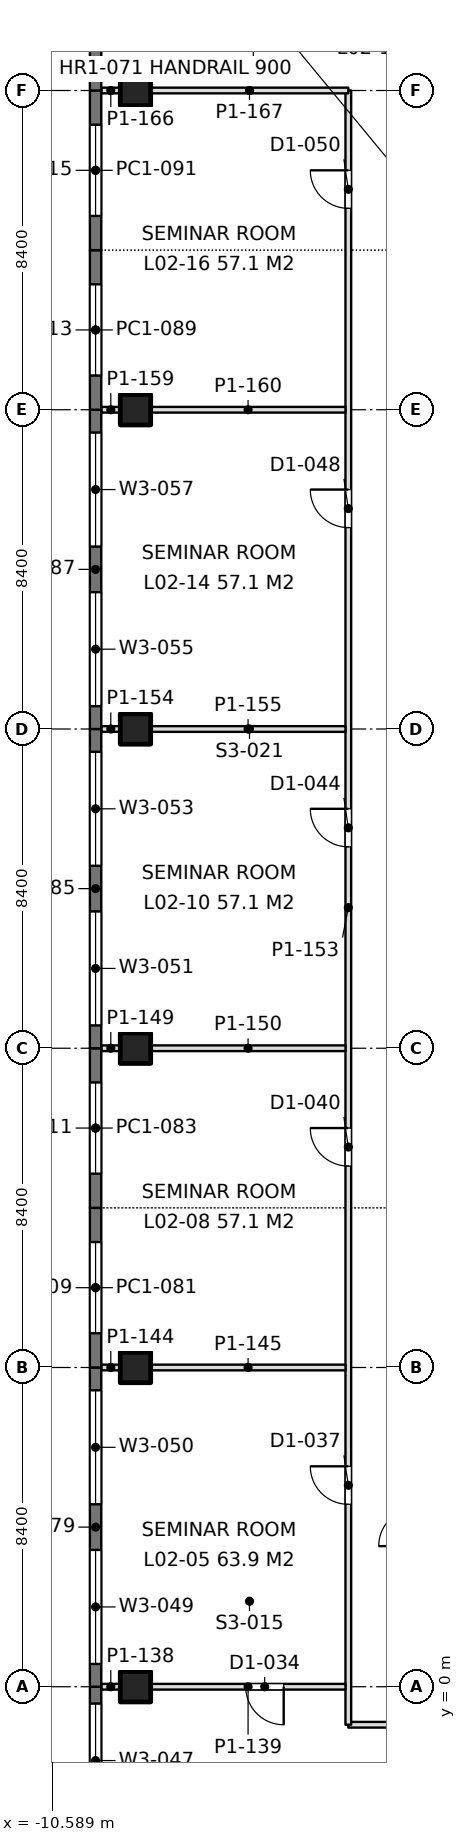
"""IFC4 building model, lengths in metres.
Left out: names, types, materials, properties, quantities, classifications, styles, units other than length and angle.
Written with IfcOpenShell. Run it as: python <this file> out.ifc"""

import sys

from ifc_helpers import new_model, si_unit, direction, frame, frame_2d, origin, origin_2d, place, context, subcontext, project, spatial, rectangle, extrude, element, fill, save


model = new_model("IFC4")
c1 = context("Model", 3, precision=1e-05, world=origin(), true_north=direction((0.0, 1.0)))
c2 = subcontext(c1, "Body", "Model", "MODEL_VIEW")
j1 = project(units=[si_unit("LENGTHUNIT", "METRE"), si_unit("PLANEANGLEUNIT", "RADIAN")], contexts=[c1])
p1 = place(None, origin())
s1 = spatial("IfcSite", under=j1, at=p1, CompositionType="ELEMENT")
p2 = place(p1, origin())
s2 = spatial("IfcBuilding", under=s1, at=p2, CompositionType="ELEMENT")
p3 = place(p2, frame((0.0, 0.0, 9.9)))
s3 = spatial("IfcBuildingStorey", under=s2, at=p3, CompositionType="ELEMENT", Elevation=9.9)
for number, where, z_axis, x_axis in (
    (1, (-8.4, 0.0, 0.0), (0.0, 0.0, 1.0), (1.0, 0.0, 0.0)),
    (2, (-8.4, 8.4, 0.0), (0.0, 0.0, 1.0), (1.0, 0.0, 0.0)),
    (3, (-8.4, 16.8, 0.0), (0.0, 0.0, 1.0), (1.0, 0.0, 0.0)),
    (4, (-8.4, 25.2, 0.0), (0.0, 0.0, 1.0), (1.0, 0.0, 0.0)),
    (5, (-8.4, 33.6, 0.0), (0.0, 0.0, 1.0), (1.0, 0.0, 0.0)),
    (6, (-8.4, 42.0, 0.0), (0.0, 0.0, 1.0), (1.0, 0.0, 0.0)),
):
    element("IfcColumn", number, at=place(p3, frame(where, z_axis=z_axis, x_axis=x_axis)), inside=s3, PredefinedType="COLUMN", context=c2, shape_type="SweptSolid", body=[
        extrude(rectangle(XDim=0.8, YDim=0.8, at=origin_2d()), origin(), (0.0, 0.0, 1.0), 4.5),
    ])
p4 = place(p3, frame((-9.45, -8.085, 0.0), z_axis=(0.0, 0.0, 1.0), x_axis=(0.0, 1.0, 0.0)))
e7 = element("IfcWall", 7, at=p4, inside=s3, PredefinedType="SOLIDWALL", context=c2, shape_type="SweptSolid", body=[
    extrude(rectangle(XDim=8.085, YDim=0.3, at=frame_2d((4.042, 0.0))), origin(), (0.0, 0.0, 1.0), 4.3),
])
p5 = place(p4, frame((0.443, 0.0, 0.9)))
e8 = element("IfcOpeningElement", 8, at=p5, cuts=e7, PredefinedType="OPENING", context=c2, shape_type="SweptSolid", body=[
    extrude(rectangle(XDim=3.0, YDim=2.4, at=frame_2d((1.5, 1.2))), frame((0.0, 0.16, 0.0), z_axis=(0.0, -1.0, 0.0), x_axis=(1.0, 0.0, 0.0)), (0.0, 0.0, 1.0), 0.32),
])
p6 = place(p4, frame((4.643, 0.0, 0.9)))
e9 = element("IfcOpeningElement", 9, at=p6, cuts=e7, PredefinedType="OPENING", context=c2, shape_type="SweptSolid", body=[
    extrude(rectangle(XDim=3.0, YDim=2.4, at=frame_2d((1.5, 1.2))), frame((0.0, 0.16, 0.0), z_axis=(0.0, -1.0, 0.0), x_axis=(1.0, 0.0, 0.0)), (0.0, 0.0, 1.0), 0.32),
])
p7 = place(p3, frame((-9.45, 0.0, 0.0), z_axis=(0.0, 0.0, 1.0), x_axis=(0.0, 1.0, 0.0)))
e10 = element("IfcWall", 10, at=p7, inside=s3, PredefinedType="SOLIDWALL", context=c2, shape_type="SweptSolid", body=[
    extrude(rectangle(XDim=8.4, YDim=0.3, at=frame_2d((4.2, 0.0))), origin(), (0.0, 0.0, 1.0), 4.3),
])
p8 = place(p7, frame((0.6, 0.0, 0.9)))
e11 = element("IfcOpeningElement", 11, at=p8, cuts=e10, PredefinedType="OPENING", context=c2, shape_type="SweptSolid", body=[
    extrude(rectangle(XDim=3.0, YDim=2.4, at=frame_2d((1.5, 1.2))), frame((0.0, 0.16, 0.0), z_axis=(0.0, -1.0, 0.0), x_axis=(1.0, 0.0, 0.0)), (0.0, 0.0, 1.0), 0.32),
])
p9 = place(p7, frame((4.8, 0.0, 0.9)))
e12 = element("IfcOpeningElement", 12, at=p9, cuts=e10, PredefinedType="OPENING", context=c2, shape_type="SweptSolid", body=[
    extrude(rectangle(XDim=3.0, YDim=2.4, at=frame_2d((1.5, 1.2))), frame((0.0, 0.16, 0.0), z_axis=(0.0, -1.0, 0.0), x_axis=(1.0, 0.0, 0.0)), (0.0, 0.0, 1.0), 0.32),
])
p10 = place(p3, frame((-9.45, 8.4, 0.0), z_axis=(0.0, 0.0, 1.0), x_axis=(0.0, 1.0, 0.0)))
e13 = element("IfcWall", 13, at=p10, inside=s3, PredefinedType="SOLIDWALL", context=c2, shape_type="SweptSolid", body=[
    extrude(rectangle(XDim=4.2, YDim=0.3, at=frame_2d((2.1, 0.0))), origin(), (0.0, 0.0, 1.0), 4.3),
])
p11 = place(p10, frame((0.9, 0.0, 0.9)))
e14 = element("IfcOpeningElement", 14, at=p11, cuts=e13, PredefinedType="OPENING", context=c2, shape_type="SweptSolid", body=[
    extrude(rectangle(XDim=2.4, YDim=1.9, at=frame_2d((1.2, 0.95))), frame((0.0, 0.16, 0.0), z_axis=(0.0, -1.0, 0.0), x_axis=(1.0, 0.0, 0.0)), (0.0, 0.0, 1.0), 0.32),
])
p12 = place(p3, frame((-9.45, 12.6, 0.0), z_axis=(0.0, 0.0, 1.0), x_axis=(0.0, 1.0, 0.0)))
e15 = element("IfcWall", 15, at=p12, inside=s3, PredefinedType="SOLIDWALL", context=c2, shape_type="SweptSolid", body=[
    extrude(rectangle(XDim=4.2, YDim=0.3, at=frame_2d((2.1, 0.0))), origin(), (0.0, 0.0, 1.0), 4.3),
])
p13 = place(p12, frame((0.9, 0.0, 0.9)))
e16 = element("IfcOpeningElement", 16, at=p13, cuts=e15, PredefinedType="OPENING", context=c2, shape_type="SweptSolid", body=[
    extrude(rectangle(XDim=2.4, YDim=1.9, at=frame_2d((1.2, 0.95))), frame((0.0, 0.16, 0.0), z_axis=(0.0, -1.0, 0.0), x_axis=(1.0, 0.0, 0.0)), (0.0, 0.0, 1.0), 0.32),
])
p14 = place(p3, frame((-9.45, 16.8, 0.0), z_axis=(0.0, 0.0, 1.0), x_axis=(0.0, 1.0, 0.0)))
e17 = element("IfcWall", 17, at=p14, inside=s3, PredefinedType="SOLIDWALL", context=c2, shape_type="SweptSolid", body=[
    extrude(rectangle(XDim=8.4, YDim=0.3, at=frame_2d((4.2, 0.0))), origin(), (0.0, 0.0, 1.0), 4.3),
])
p15 = place(p14, frame((0.6, 0.0, 0.9)))
e18 = element("IfcOpeningElement", 18, at=p15, cuts=e17, PredefinedType="OPENING", context=c2, shape_type="SweptSolid", body=[
    extrude(rectangle(XDim=3.0, YDim=2.4, at=frame_2d((1.5, 1.2))), frame((0.0, 0.16, 0.0), z_axis=(0.0, -1.0, 0.0), x_axis=(1.0, 0.0, 0.0)), (0.0, 0.0, 1.0), 0.32),
])
p16 = place(p14, frame((4.8, 0.0, 0.9)))
e19 = element("IfcOpeningElement", 19, at=p16, cuts=e17, PredefinedType="OPENING", context=c2, shape_type="SweptSolid", body=[
    extrude(rectangle(XDim=3.0, YDim=2.4, at=frame_2d((1.5, 1.2))), frame((0.0, 0.16, 0.0), z_axis=(0.0, -1.0, 0.0), x_axis=(1.0, 0.0, 0.0)), (0.0, 0.0, 1.0), 0.32),
])
p17 = place(p3, frame((-9.45, 25.2, 0.0), z_axis=(0.0, 0.0, 1.0), x_axis=(0.0, 1.0, 0.0)))
e20 = element("IfcWall", 20, at=p17, inside=s3, PredefinedType="SOLIDWALL", context=c2, shape_type="SweptSolid", body=[
    extrude(rectangle(XDim=8.4, YDim=0.3, at=frame_2d((4.2, 0.0))), origin(), (0.0, 0.0, 1.0), 4.3),
])
p18 = place(p17, frame((0.6, 0.0, 0.9)))
e21 = element("IfcOpeningElement", 21, at=p18, cuts=e20, PredefinedType="OPENING", context=c2, shape_type="SweptSolid", body=[
    extrude(rectangle(XDim=3.0, YDim=2.4, at=frame_2d((1.5, 1.2))), frame((0.0, 0.16, 0.0), z_axis=(0.0, -1.0, 0.0), x_axis=(1.0, 0.0, 0.0)), (0.0, 0.0, 1.0), 0.32),
])
p19 = place(p17, frame((4.8, 0.0, 0.9)))
e22 = element("IfcOpeningElement", 22, at=p19, cuts=e20, PredefinedType="OPENING", context=c2, shape_type="SweptSolid", body=[
    extrude(rectangle(XDim=3.0, YDim=2.4, at=frame_2d((1.5, 1.2))), frame((0.0, 0.16, 0.0), z_axis=(0.0, -1.0, 0.0), x_axis=(1.0, 0.0, 0.0)), (0.0, 0.0, 1.0), 0.32),
])
p20 = place(p3, frame((-9.45, 33.6, 0.0), z_axis=(0.0, 0.0, 1.0), x_axis=(0.0, 1.0, 0.0)))
e23 = element("IfcWall", 23, at=p20, inside=s3, PredefinedType="SOLIDWALL", context=c2, shape_type="SweptSolid", body=[
    extrude(rectangle(XDim=4.2, YDim=0.3, at=frame_2d((2.1, 0.0))), origin(), (0.0, 0.0, 1.0), 4.3),
])
p21 = place(p20, frame((0.9, 0.0, 0.9)))
e24 = element("IfcOpeningElement", 24, at=p21, cuts=e23, PredefinedType="OPENING", context=c2, shape_type="SweptSolid", body=[
    extrude(rectangle(XDim=2.4, YDim=1.9, at=frame_2d((1.2, 0.95))), frame((0.0, 0.16, 0.0), z_axis=(0.0, -1.0, 0.0), x_axis=(1.0, 0.0, 0.0)), (0.0, 0.0, 1.0), 0.32),
])
p22 = place(p3, frame((-9.45, 37.8, 0.0), z_axis=(0.0, 0.0, 1.0), x_axis=(0.0, 1.0, 0.0)))
e25 = element("IfcWall", 25, at=p22, inside=s3, PredefinedType="SOLIDWALL", context=c2, shape_type="SweptSolid", body=[
    extrude(rectangle(XDim=4.2, YDim=0.3, at=frame_2d((2.1, 0.0))), origin(), (0.0, 0.0, 1.0), 4.3),
])
p23 = place(p22, frame((0.9, 0.0, 0.9)))
e26 = element("IfcOpeningElement", 26, at=p23, cuts=e25, PredefinedType="OPENING", context=c2, shape_type="SweptSolid", body=[
    extrude(rectangle(XDim=2.4, YDim=1.9, at=frame_2d((1.2, 0.95))), frame((0.0, 0.16, 0.0), z_axis=(0.0, -1.0, 0.0), x_axis=(1.0, 0.0, 0.0)), (0.0, 0.0, 1.0), 0.32),
])
p24 = place(p3, frame((-9.45, 42.0, 0.0), z_axis=(0.0, 0.0, 1.0), x_axis=(0.0, 1.0, 0.0)))
e27 = element("IfcWall", 27, at=p24, inside=s3, PredefinedType="SOLIDWALL", context=c2, shape_type="SweptSolid", body=[
    extrude(rectangle(XDim=8.4, YDim=0.3, at=frame_2d((4.2, 0.0))), origin(), (0.0, 0.0, 1.0), 4.3),
])
p25 = place(p3, frame((-2.8, -1.0, 0.0), z_axis=(0.0, 0.0, 1.0), x_axis=(1.0, 0.0, 0.0)))
e28 = element("IfcWall", 28, at=p25, inside=s3, PredefinedType="PARTITIONING", context=c2, shape_type="SweptSolid", body=[
    extrude(rectangle(XDim=4.18, YDim=0.15, at=frame_2d((2.09, 0.0))), origin(), (0.0, 0.0, 1.0), 3.65),
])
p26 = place(p3, frame((-9.3, 0.0, 0.0), z_axis=(0.0, 0.0, 1.0), x_axis=(1.0, 0.0, 0.0)))
e29 = element("IfcWall", 29, at=p26, inside=s3, PredefinedType="PARTITIONING", context=c2, shape_type="SweptSolid", body=[
    extrude(rectangle(XDim=0.501, YDim=0.15, at=frame_2d((0.25, 0.0))), origin(), (0.0, 0.0, 1.0), 4.3),
])
p27 = place(p3, frame((-8.001, 0.0, 0.0), z_axis=(0.0, 0.0, 1.0), x_axis=(1.0, 0.0, 0.0)))
e30 = element("IfcWall", 30, at=p27, inside=s3, PredefinedType="PARTITIONING", context=c2, shape_type="SweptSolid", body=[
    extrude(rectangle(XDim=5.127, YDim=0.15, at=frame_2d((2.563, 0.0))), origin(), (0.0, 0.0, 1.0), 3.65),
])
p28 = place(p27, frame((2.501, 0.0, 0.0)))
e31 = element("IfcOpeningElement", 31, at=p28, cuts=e30, PredefinedType="OPENING", context=c2, shape_type="SweptSolid", body=[
    extrude(rectangle(XDim=1.0, YDim=2.2, at=frame_2d((0.5, 1.1))), frame((0.0, 0.085, 0.0), z_axis=(0.0, -1.0, 0.0), x_axis=(1.0, 0.0, 0.0)), (0.0, 0.0, 1.0), 0.17),
])
p29 = place(p3, frame((-2.8, -1.0, 0.0), z_axis=(0.0, 0.0, 1.0), x_axis=(0.0, 1.0, 0.0)))
e32 = element("IfcWall", 32, at=p29, inside=s3, PredefinedType="PARTITIONING", context=c2, shape_type="SweptSolid", body=[
    extrude(rectangle(XDim=43.0, YDim=0.15, at=frame_2d((21.5, 0.0))), origin(), (0.0, 0.0, 1.0), 3.65),
])
p30 = place(p29, frame((5.8, 0.0, 0.0)))
e33 = element("IfcOpeningElement", 33, at=p30, cuts=e32, PredefinedType="OPENING", context=c2, shape_type="SweptSolid", body=[
    extrude(rectangle(XDim=1.0, YDim=2.2, at=frame_2d((0.5, 1.1))), frame((0.0, 0.085, 0.0), z_axis=(0.0, -1.0, 0.0), x_axis=(1.0, 0.0, 0.0)), (0.0, 0.0, 1.0), 0.17),
])
p31 = place(p29, frame((14.7, 0.0, 0.0)))
e34 = element("IfcOpeningElement", 34, at=p31, cuts=e32, PredefinedType="OPENING", context=c2, shape_type="SweptSolid", body=[
    extrude(rectangle(XDim=1.0, YDim=2.2, at=frame_2d((0.5, 1.1))), frame((0.0, 0.085, 0.0), z_axis=(0.0, -1.0, 0.0), x_axis=(1.0, 0.0, 0.0)), (0.0, 0.0, 1.0), 0.17),
])
p32 = place(p29, frame((23.1, 0.0, 0.0)))
e35 = element("IfcOpeningElement", 35, at=p32, cuts=e32, PredefinedType="OPENING", context=c2, shape_type="SweptSolid", body=[
    extrude(rectangle(XDim=1.0, YDim=2.2, at=frame_2d((0.5, 1.1))), frame((0.0, 0.085, 0.0), z_axis=(0.0, -1.0, 0.0), x_axis=(1.0, 0.0, 0.0)), (0.0, 0.0, 1.0), 0.17),
])
p33 = place(p29, frame((31.5, 0.0, 0.0)))
e36 = element("IfcOpeningElement", 36, at=p33, cuts=e32, PredefinedType="OPENING", context=c2, shape_type="SweptSolid", body=[
    extrude(rectangle(XDim=1.0, YDim=2.2, at=frame_2d((0.5, 1.1))), frame((0.0, 0.085, 0.0), z_axis=(0.0, -1.0, 0.0), x_axis=(1.0, 0.0, 0.0)), (0.0, 0.0, 1.0), 0.17),
])
p34 = place(p29, frame((39.9, 0.0, 0.0)))
e37 = element("IfcOpeningElement", 37, at=p34, cuts=e32, PredefinedType="OPENING", context=c2, shape_type="SweptSolid", body=[
    extrude(rectangle(XDim=1.0, YDim=2.2, at=frame_2d((0.5, 1.1))), frame((0.0, 0.085, 0.0), z_axis=(0.0, -1.0, 0.0), x_axis=(1.0, 0.0, 0.0)), (0.0, 0.0, 1.0), 0.17),
])
p35 = place(p3, frame((-9.3, 8.4, 0.0), z_axis=(0.0, 0.0, 1.0), x_axis=(1.0, 0.0, 0.0)))
e38 = element("IfcWall", 38, at=p35, inside=s3, PredefinedType="PARTITIONING", context=c2, shape_type="SweptSolid", body=[
    extrude(rectangle(XDim=0.501, YDim=0.15, at=frame_2d((0.25, 0.0))), origin(), (0.0, 0.0, 1.0), 4.3),
])
p36 = place(p3, frame((-8.001, 8.4, 0.0), z_axis=(0.0, 0.0, 1.0), x_axis=(1.0, 0.0, 0.0)))
e39 = element("IfcWall", 39, at=p36, inside=s3, PredefinedType="PARTITIONING", context=c2, shape_type="SweptSolid", body=[
    extrude(rectangle(XDim=5.127, YDim=0.15, at=frame_2d((2.563, 0.0))), origin(), (0.0, 0.0, 1.0), 3.65),
])
p37 = place(p3, frame((-9.3, 16.8, 0.0), z_axis=(0.0, 0.0, 1.0), x_axis=(1.0, 0.0, 0.0)))
e40 = element("IfcWall", 40, at=p37, inside=s3, PredefinedType="PARTITIONING", context=c2, shape_type="SweptSolid", body=[
    extrude(rectangle(XDim=0.501, YDim=0.15, at=frame_2d((0.25, 0.0))), origin(), (0.0, 0.0, 1.0), 4.3),
])
p38 = place(p3, frame((-8.001, 16.8, 0.0), z_axis=(0.0, 0.0, 1.0), x_axis=(1.0, 0.0, 0.0)))
e41 = element("IfcWall", 41, at=p38, inside=s3, PredefinedType="PARTITIONING", context=c2, shape_type="SweptSolid", body=[
    extrude(rectangle(XDim=5.127, YDim=0.15, at=frame_2d((2.563, 0.0))), origin(), (0.0, 0.0, 1.0), 3.65),
])
p39 = place(p3, frame((-9.3, 25.2, 0.0), z_axis=(0.0, 0.0, 1.0), x_axis=(1.0, 0.0, 0.0)))
e42 = element("IfcWall", 42, at=p39, inside=s3, PredefinedType="PARTITIONING", context=c2, shape_type="SweptSolid", body=[
    extrude(rectangle(XDim=0.501, YDim=0.15, at=frame_2d((0.25, 0.0))), origin(), (0.0, 0.0, 1.0), 4.3),
])
p40 = place(p3, frame((-8.001, 25.2, 0.0), z_axis=(0.0, 0.0, 1.0), x_axis=(1.0, 0.0, 0.0)))
e43 = element("IfcWall", 43, at=p40, inside=s3, PredefinedType="PARTITIONING", context=c2, shape_type="SweptSolid", body=[
    extrude(rectangle(XDim=5.127, YDim=0.15, at=frame_2d((2.563, 0.0))), origin(), (0.0, 0.0, 1.0), 3.65),
])
p41 = place(p3, frame((-9.3, 33.6, 0.0), z_axis=(0.0, 0.0, 1.0), x_axis=(1.0, 0.0, 0.0)))
e44 = element("IfcWall", 44, at=p41, inside=s3, PredefinedType="PARTITIONING", context=c2, shape_type="SweptSolid", body=[
    extrude(rectangle(XDim=0.501, YDim=0.15, at=frame_2d((0.25, 0.0))), origin(), (0.0, 0.0, 1.0), 4.3),
])
p42 = place(p3, frame((-8.001, 33.6, 0.0), z_axis=(0.0, 0.0, 1.0), x_axis=(1.0, 0.0, 0.0)))
e45 = element("IfcWall", 45, at=p42, inside=s3, PredefinedType="PARTITIONING", context=c2, shape_type="SweptSolid", body=[
    extrude(rectangle(XDim=5.127, YDim=0.15, at=frame_2d((2.563, 0.0))), origin(), (0.0, 0.0, 1.0), 3.65),
])
p43 = place(p3, frame((-9.3, 42.0, 0.0), z_axis=(0.0, 0.0, 1.0), x_axis=(1.0, 0.0, 0.0)))
e46 = element("IfcWall", 46, at=p43, inside=s3, PredefinedType="PARTITIONING", context=c2, shape_type="SweptSolid", body=[
    extrude(rectangle(XDim=0.501, YDim=0.15, at=frame_2d((0.25, 0.0))), origin(), (0.0, 0.0, 1.0), 4.3),
])
p44 = place(p3, frame((-8.001, 42.0, 0.0), z_axis=(0.0, 0.0, 1.0), x_axis=(1.0, 0.0, 0.0)))
e47 = element("IfcWall", 47, at=p44, inside=s3, PredefinedType="PARTITIONING", context=c2, shape_type="SweptSolid", body=[
    extrude(rectangle(XDim=5.201, YDim=0.15, at=frame_2d((2.601, 0.0))), origin(), (0.0, 0.0, 1.0), 3.65),
])
p45 = place(p6, origin())
e48 = element("IfcWindow", 48, at=p45, inside=s3, PartitioningType="SINGLE_PANEL", PredefinedType="WINDOW", context=c2, shape_type="SweptSolid", body=[
    extrude(rectangle(XDim=3.0, YDim=2.4, at=frame_2d((1.5, 1.2))), frame((0.0, 0.03, 0.0), z_axis=(0.0, -1.0, 0.0), x_axis=(1.0, 0.0, 0.0)), (0.0, 0.0, 1.0), 0.06),
])
fill(e9, e48)
p46 = place(p8, origin())
e49 = element("IfcWindow", 49, at=p46, inside=s3, PartitioningType="SINGLE_PANEL", PredefinedType="WINDOW", context=c2, shape_type="SweptSolid", body=[
    extrude(rectangle(XDim=3.0, YDim=2.4, at=frame_2d((1.5, 1.2))), frame((0.0, 0.03, 0.0), z_axis=(0.0, -1.0, 0.0), x_axis=(1.0, 0.0, 0.0)), (0.0, 0.0, 1.0), 0.06),
])
fill(e11, e49)
p47 = place(p9, origin())
e50 = element("IfcWindow", 50, at=p47, inside=s3, PartitioningType="SINGLE_PANEL", PredefinedType="WINDOW", context=c2, shape_type="SweptSolid", body=[
    extrude(rectangle(XDim=3.0, YDim=2.4, at=frame_2d((1.5, 1.2))), frame((0.0, 0.03, 0.0), z_axis=(0.0, -1.0, 0.0), x_axis=(1.0, 0.0, 0.0)), (0.0, 0.0, 1.0), 0.06),
])
fill(e12, e50)
p48 = place(p11, origin())
e51 = element("IfcWindow", 51, at=p48, inside=s3, PartitioningType="SINGLE_PANEL", PredefinedType="WINDOW", context=c2, shape_type="SweptSolid", body=[
    extrude(rectangle(XDim=2.4, YDim=1.9, at=frame_2d((1.2, 0.95))), frame((0.0, 0.03, 0.0), z_axis=(0.0, -1.0, 0.0), x_axis=(1.0, 0.0, 0.0)), (0.0, 0.0, 1.0), 0.06),
])
fill(e14, e51)
p49 = place(p13, origin())
e52 = element("IfcWindow", 52, at=p49, inside=s3, PartitioningType="SINGLE_PANEL", PredefinedType="WINDOW", context=c2, shape_type="SweptSolid", body=[
    extrude(rectangle(XDim=2.4, YDim=1.9, at=frame_2d((1.2, 0.95))), frame((0.0, 0.03, 0.0), z_axis=(0.0, -1.0, 0.0), x_axis=(1.0, 0.0, 0.0)), (0.0, 0.0, 1.0), 0.06),
])
fill(e16, e52)
p50 = place(p15, origin())
e53 = element("IfcWindow", 53, at=p50, inside=s3, PartitioningType="SINGLE_PANEL", PredefinedType="WINDOW", context=c2, shape_type="SweptSolid", body=[
    extrude(rectangle(XDim=3.0, YDim=2.4, at=frame_2d((1.5, 1.2))), frame((0.0, 0.03, 0.0), z_axis=(0.0, -1.0, 0.0), x_axis=(1.0, 0.0, 0.0)), (0.0, 0.0, 1.0), 0.06),
])
fill(e18, e53)
p51 = place(p16, origin())
e54 = element("IfcWindow", 54, at=p51, inside=s3, PartitioningType="SINGLE_PANEL", PredefinedType="WINDOW", context=c2, shape_type="SweptSolid", body=[
    extrude(rectangle(XDim=3.0, YDim=2.4, at=frame_2d((1.5, 1.2))), frame((0.0, 0.03, 0.0), z_axis=(0.0, -1.0, 0.0), x_axis=(1.0, 0.0, 0.0)), (0.0, 0.0, 1.0), 0.06),
])
fill(e19, e54)
p52 = place(p18, origin())
e55 = element("IfcWindow", 55, at=p52, inside=s3, PartitioningType="SINGLE_PANEL", PredefinedType="WINDOW", context=c2, shape_type="SweptSolid", body=[
    extrude(rectangle(XDim=3.0, YDim=2.4, at=frame_2d((1.5, 1.2))), frame((0.0, 0.03, 0.0), z_axis=(0.0, -1.0, 0.0), x_axis=(1.0, 0.0, 0.0)), (0.0, 0.0, 1.0), 0.06),
])
fill(e21, e55)
p53 = place(p19, origin())
e56 = element("IfcWindow", 56, at=p53, inside=s3, PartitioningType="SINGLE_PANEL", PredefinedType="WINDOW", context=c2, shape_type="SweptSolid", body=[
    extrude(rectangle(XDim=3.0, YDim=2.4, at=frame_2d((1.5, 1.2))), frame((0.0, 0.03, 0.0), z_axis=(0.0, -1.0, 0.0), x_axis=(1.0, 0.0, 0.0)), (0.0, 0.0, 1.0), 0.06),
])
fill(e22, e56)
p54 = place(p21, origin())
e57 = element("IfcWindow", 57, at=p54, inside=s3, PartitioningType="SINGLE_PANEL", PredefinedType="WINDOW", context=c2, shape_type="SweptSolid", body=[
    extrude(rectangle(XDim=2.4, YDim=1.9, at=frame_2d((1.2, 0.95))), frame((0.0, 0.03, 0.0), z_axis=(0.0, -1.0, 0.0), x_axis=(1.0, 0.0, 0.0)), (0.0, 0.0, 1.0), 0.06),
])
fill(e24, e57)
p55 = place(p23, origin())
e58 = element("IfcWindow", 58, at=p55, inside=s3, PartitioningType="SINGLE_PANEL", PredefinedType="WINDOW", context=c2, shape_type="SweptSolid", body=[
    extrude(rectangle(XDim=2.4, YDim=1.9, at=frame_2d((1.2, 0.95))), frame((0.0, 0.03, 0.0), z_axis=(0.0, -1.0, 0.0), x_axis=(1.0, 0.0, 0.0)), (0.0, 0.0, 1.0), 0.06),
])
fill(e26, e58)
p56 = place(p28, frame((1.0, 0.0, 0.0), z_axis=(0.0, 0.0, 1.0), x_axis=(-1.0, 0.0, 0.0)))
e59 = element("IfcDoor", 59, at=p56, inside=s3, OperationType="SINGLE_SWING_LEFT", PredefinedType="DOOR", context=c2, shape_type="SweptSolid", body=[
    extrude(rectangle(XDim=1.0, YDim=2.2, at=frame_2d((0.5, 1.1))), frame((0.0, 0.025, 0.0), z_axis=(0.0, -1.0, 0.0), x_axis=(1.0, 0.0, 0.0)), (0.0, 0.0, 1.0), 0.05),
])
fill(e31, e59)
p57 = place(p30, origin())
e60 = element("IfcDoor", 60, at=p57, inside=s3, OperationType="SINGLE_SWING_RIGHT", PredefinedType="DOOR", context=c2, shape_type="SweptSolid", body=[
    extrude(rectangle(XDim=1.0, YDim=2.2, at=frame_2d((0.5, 1.1))), frame((0.0, 0.025, 0.0), z_axis=(0.0, -1.0, 0.0), x_axis=(1.0, 0.0, 0.0)), (0.0, 0.0, 1.0), 0.05),
])
fill(e33, e60)
p58 = place(p31, origin())
e61 = element("IfcDoor", 61, at=p58, inside=s3, OperationType="SINGLE_SWING_RIGHT", PredefinedType="DOOR", context=c2, shape_type="SweptSolid", body=[
    extrude(rectangle(XDim=1.0, YDim=2.2, at=frame_2d((0.5, 1.1))), frame((0.0, 0.025, 0.0), z_axis=(0.0, -1.0, 0.0), x_axis=(1.0, 0.0, 0.0)), (0.0, 0.0, 1.0), 0.05),
])
fill(e34, e61)
p59 = place(p32, origin())
e62 = element("IfcDoor", 62, at=p59, inside=s3, OperationType="SINGLE_SWING_RIGHT", PredefinedType="DOOR", context=c2, shape_type="SweptSolid", body=[
    extrude(rectangle(XDim=1.0, YDim=2.2, at=frame_2d((0.5, 1.1))), frame((0.0, 0.025, 0.0), z_axis=(0.0, -1.0, 0.0), x_axis=(1.0, 0.0, 0.0)), (0.0, 0.0, 1.0), 0.05),
])
fill(e35, e62)
p60 = place(p33, origin())
e63 = element("IfcDoor", 63, at=p60, inside=s3, OperationType="SINGLE_SWING_RIGHT", PredefinedType="DOOR", context=c2, shape_type="SweptSolid", body=[
    extrude(rectangle(XDim=1.0, YDim=2.2, at=frame_2d((0.5, 1.1))), frame((0.0, 0.025, 0.0), z_axis=(0.0, -1.0, 0.0), x_axis=(1.0, 0.0, 0.0)), (0.0, 0.0, 1.0), 0.05),
])
fill(e36, e63)
p61 = place(p34, origin())
e64 = element("IfcDoor", 64, at=p61, inside=s3, OperationType="SINGLE_SWING_RIGHT", PredefinedType="DOOR", context=c2, shape_type="SweptSolid", body=[
    extrude(rectangle(XDim=1.0, YDim=2.2, at=frame_2d((0.5, 1.1))), frame((0.0, 0.025, 0.0), z_axis=(0.0, -1.0, 0.0), x_axis=(1.0, 0.0, 0.0)), (0.0, 0.0, 1.0), 0.05),
])
fill(e37, e64)
save(model, sys.argv[1])
